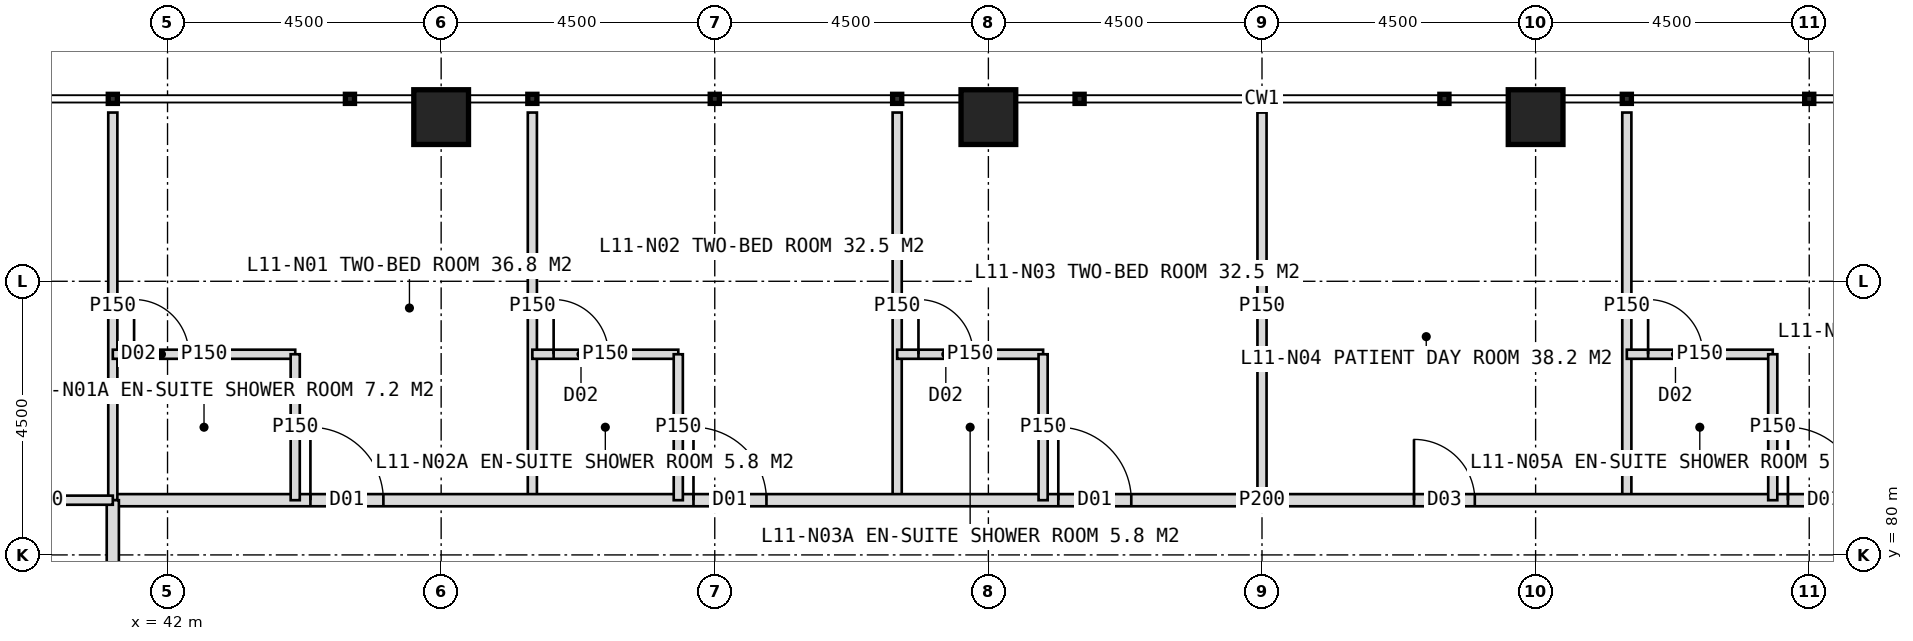
"""IFC4 building model, lengths in metres.
Left out: names, types, materials, properties, quantities, classifications, styles, units other than length and angle.
Written with IfcOpenShell. Run it as: python <this file> out.ifc"""

import sys

from ifc_helpers import new_model, si_unit, direction, frame, frame_2d, origin, origin_2d, place, context, subcontext, project, spatial, rectangle, hollow_rectangle, extrude, element, fill, save


model = new_model("IFC4")
c1 = context("Model", 3, precision=1e-05, world=origin(), true_north=direction((0.0, 1.0)))
c2 = subcontext(c1, "Body", "Model", "MODEL_VIEW")
j1 = project(units=[si_unit("LENGTHUNIT", "METRE"), si_unit("PLANEANGLEUNIT", "RADIAN")], contexts=[c1])
p1 = place(None, origin())
s1 = spatial("IfcSite", under=j1, at=p1, CompositionType="ELEMENT")
p2 = place(p1, origin())
s2 = spatial("IfcBuilding", under=s1, at=p2, CompositionType="ELEMENT")
p3 = place(p2, frame((0.0, 0.0, 51.0)))
s3 = spatial("IfcBuildingStorey", under=s2, at=p3, CompositionType="ELEMENT", Elevation=51.0)
for number, where, z_axis, x_axis in (
    (1, (46.5, 87.2, 0.0), (0.0, 0.0, 1.0), (1.0, 0.0, 0.0)),
    (2, (55.5, 87.2, 0.0), (0.0, 0.0, 1.0), (1.0, 0.0, 0.0)),
    (3, (64.5, 87.2, 0.0), (0.0, 0.0, 1.0), (1.0, 0.0, 0.0)),
):
    element("IfcColumn", number, at=place(p3, frame(where, z_axis=z_axis, x_axis=x_axis)), inside=s3, PredefinedType="COLUMN", context=c2, shape_type="SweptSolid", body=[
        extrude(hollow_rectangle(XDim=0.9, YDim=0.9, WallThickness=0.08, at=origin_2d()), origin(), (0.0, 0.0, 1.0), 4.0),
    ])
for number, where, z_axis, x_axis in (
    (4, (48.0, 80.9, 0.0), (0.0, 0.0, 1.0), (0.0, 1.0, 0.0)),
    (5, (54.0, 80.9, 0.0), (0.0, 0.0, 1.0), (0.0, 1.0, 0.0)),
):
    element("IfcWall", number, at=place(p3, frame(where, z_axis=z_axis, x_axis=x_axis)), inside=s3, PredefinedType="PARTITIONING", context=c2, shape_type="SweptSolid", body=[
        extrude(rectangle(XDim=6.375, YDim=0.15, at=frame_2d((3.188, 0.0))), origin(), (0.0, 0.0, 1.0), 3.75),
    ])
p4 = place(p3, frame((60.0, 80.9, 0.0), z_axis=(0.0, 0.0, 1.0), x_axis=(0.0, 1.0, 0.0)))
e6 = element("IfcWall", 6, at=p4, inside=s3, PredefinedType="PARTITIONING", context=c2, shape_type="SweptSolid", body=[
    extrude(rectangle(XDim=6.375, YDim=0.15, at=frame_2d((3.188, 0.0))), origin(), (0.0, 0.0, 1.0), 2.75),
])
p5 = place(p3, frame((66.0, 80.9, 0.0), z_axis=(0.0, 0.0, 1.0), x_axis=(0.0, 1.0, 0.0)))
e7 = element("IfcWall", 7, at=p5, inside=s3, PredefinedType="PARTITIONING", context=c2, shape_type="SweptSolid", body=[
    extrude(rectangle(XDim=6.375, YDim=0.15, at=frame_2d((3.188, 0.0))), origin(), (0.0, 0.0, 1.0), 3.75),
])
p6 = place(p3, frame((41.1, 80.9, 0.0), z_axis=(0.0, 0.0, 1.0), x_axis=(1.0, 0.0, 0.0)))
e8 = element("IfcWall", 8, at=p6, inside=s3, PredefinedType="PARTITIONING", context=c2, shape_type="SweptSolid", body=[
    extrude(rectangle(XDim=37.8, YDim=0.2, at=frame_2d((18.9, 0.0))), origin(), (0.0, 0.0, 1.0), 3.75),
])
p7 = place(p6, frame((3.25, 0.0, 0.0)))
e9 = element("IfcOpeningElement", 9, at=p7, cuts=e8, PredefinedType="OPENING", context=c2, shape_type="SweptSolid", body=[
    extrude(rectangle(XDim=1.2, YDim=2.2, at=frame_2d((0.6, 1.1))), frame((0.0, 0.11, 0.0), z_axis=(0.0, -1.0, 0.0), x_axis=(1.0, 0.0, 0.0)), (0.0, 0.0, 1.0), 0.22),
])
p8 = place(p6, frame((9.55, 0.0, 0.0)))
e10 = element("IfcOpeningElement", 10, at=p8, cuts=e8, PredefinedType="OPENING", context=c2, shape_type="SweptSolid", body=[
    extrude(rectangle(XDim=1.2, YDim=2.2, at=frame_2d((0.6, 1.1))), frame((0.0, 0.11, 0.0), z_axis=(0.0, -1.0, 0.0), x_axis=(1.0, 0.0, 0.0)), (0.0, 0.0, 1.0), 0.22),
])
p9 = place(p6, frame((15.55, 0.0, 0.0)))
e11 = element("IfcOpeningElement", 11, at=p9, cuts=e8, PredefinedType="OPENING", context=c2, shape_type="SweptSolid", body=[
    extrude(rectangle(XDim=1.2, YDim=2.2, at=frame_2d((0.6, 1.1))), frame((0.0, 0.11, 0.0), z_axis=(0.0, -1.0, 0.0), x_axis=(1.0, 0.0, 0.0)), (0.0, 0.0, 1.0), 0.22),
])
p10 = place(p6, frame((21.4, 0.0, 0.0)))
e12 = element("IfcOpeningElement", 12, at=p10, cuts=e8, PredefinedType="OPENING", context=c2, shape_type="SweptSolid", body=[
    extrude(rectangle(XDim=1.0, YDim=2.1, at=frame_2d((0.5, 1.05))), frame((0.0, 0.11, 0.0), z_axis=(0.0, -1.0, 0.0), x_axis=(1.0, 0.0, 0.0)), (0.0, 0.0, 1.0), 0.22),
])
p11 = place(p6, frame((27.55, 0.0, 0.0)))
e13 = element("IfcOpeningElement", 13, at=p11, cuts=e8, PredefinedType="OPENING", context=c2, shape_type="SweptSolid", body=[
    extrude(rectangle(XDim=1.2, YDim=2.2, at=frame_2d((0.6, 1.1))), frame((0.0, 0.11, 0.0), z_axis=(0.0, -1.0, 0.0), x_axis=(1.0, 0.0, 0.0)), (0.0, 0.0, 1.0), 0.22),
])
p12 = place(p3, frame((41.1, 80.9, 0.0), z_axis=(0.0, 0.0, 1.0), x_axis=(0.0, 1.0, 0.0)))
e14 = element("IfcWall", 14, at=p12, inside=s3, PredefinedType="PARTITIONING", context=c2, shape_type="SweptSolid", body=[
    extrude(rectangle(XDim=6.375, YDim=0.15, at=frame_2d((3.188, 0.0))), origin(), (0.0, 0.0, 1.0), 3.75),
])
p13 = place(p3, frame((41.1, 83.3, 0.0), z_axis=(0.0, 0.0, 1.0), x_axis=(1.0, 0.0, 0.0)))
e15 = element("IfcWall", 15, at=p13, inside=s3, PredefinedType="PARTITIONING", context=c2, shape_type="SweptSolid", body=[
    extrude(rectangle(XDim=3.0, YDim=0.15, at=frame_2d((1.5, 0.0))), origin(), (0.0, 0.0, 1.0), 3.75),
])
p14 = place(p13, frame((0.35, 0.0, 0.0)))
e16 = element("IfcOpeningElement", 16, at=p14, cuts=e15, PredefinedType="OPENING", context=c2, shape_type="SweptSolid", body=[
    extrude(rectangle(XDim=0.9, YDim=2.1, at=frame_2d((0.45, 1.05))), frame((0.0, 0.085, 0.0), z_axis=(0.0, -1.0, 0.0), x_axis=(1.0, 0.0, 0.0)), (0.0, 0.0, 1.0), 0.17),
])
p15 = place(p3, frame((44.1, 80.9, 0.0), z_axis=(0.0, 0.0, 1.0), x_axis=(0.0, 1.0, 0.0)))
e17 = element("IfcWall", 17, at=p15, inside=s3, PredefinedType="PARTITIONING", context=c2, shape_type="SweptSolid", body=[
    extrude(rectangle(XDim=2.4, YDim=0.15, at=frame_2d((1.2, 0.0))), origin(), (0.0, 0.0, 1.0), 3.75),
])
p16 = place(p3, frame((48.0, 83.3, 0.0), z_axis=(0.0, 0.0, 1.0), x_axis=(1.0, 0.0, 0.0)))
e18 = element("IfcWall", 18, at=p16, inside=s3, PredefinedType="PARTITIONING", context=c2, shape_type="SweptSolid", body=[
    extrude(rectangle(XDim=2.4, YDim=0.15, at=frame_2d((1.2, 0.0))), origin(), (0.0, 0.0, 1.0), 3.75),
])
p17 = place(p16, frame((0.35, 0.0, 0.0)))
e19 = element("IfcOpeningElement", 19, at=p17, cuts=e18, PredefinedType="OPENING", context=c2, shape_type="SweptSolid", body=[
    extrude(rectangle(XDim=0.9, YDim=2.1, at=frame_2d((0.45, 1.05))), frame((0.0, 0.085, 0.0), z_axis=(0.0, -1.0, 0.0), x_axis=(1.0, 0.0, 0.0)), (0.0, 0.0, 1.0), 0.17),
])
p18 = place(p3, frame((50.4, 80.9, 0.0), z_axis=(0.0, 0.0, 1.0), x_axis=(0.0, 1.0, 0.0)))
e20 = element("IfcWall", 20, at=p18, inside=s3, PredefinedType="PARTITIONING", context=c2, shape_type="SweptSolid", body=[
    extrude(rectangle(XDim=2.4, YDim=0.15, at=frame_2d((1.2, 0.0))), origin(), (0.0, 0.0, 1.0), 3.75),
])
p19 = place(p3, frame((54.0, 83.3, 0.0), z_axis=(0.0, 0.0, 1.0), x_axis=(1.0, 0.0, 0.0)))
e21 = element("IfcWall", 21, at=p19, inside=s3, PredefinedType="PARTITIONING", context=c2, shape_type="SweptSolid", body=[
    extrude(rectangle(XDim=2.4, YDim=0.15, at=frame_2d((1.2, 0.0))), origin(), (0.0, 0.0, 1.0), 3.75),
])
p20 = place(p19, frame((0.35, 0.0, 0.0)))
e22 = element("IfcOpeningElement", 22, at=p20, cuts=e21, PredefinedType="OPENING", context=c2, shape_type="SweptSolid", body=[
    extrude(rectangle(XDim=0.9, YDim=2.1, at=frame_2d((0.45, 1.05))), frame((0.0, 0.085, 0.0), z_axis=(0.0, -1.0, 0.0), x_axis=(1.0, 0.0, 0.0)), (0.0, 0.0, 1.0), 0.17),
])
p21 = place(p3, frame((56.4, 80.9, 0.0), z_axis=(0.0, 0.0, 1.0), x_axis=(0.0, 1.0, 0.0)))
e23 = element("IfcWall", 23, at=p21, inside=s3, PredefinedType="PARTITIONING", context=c2, shape_type="SweptSolid", body=[
    extrude(rectangle(XDim=2.4, YDim=0.15, at=frame_2d((1.2, 0.0))), origin(), (0.0, 0.0, 1.0), 3.75),
])
p22 = place(p3, frame((66.0, 83.3, 0.0), z_axis=(0.0, 0.0, 1.0), x_axis=(1.0, 0.0, 0.0)))
e24 = element("IfcWall", 24, at=p22, inside=s3, PredefinedType="PARTITIONING", context=c2, shape_type="SweptSolid", body=[
    extrude(rectangle(XDim=2.4, YDim=0.15, at=frame_2d((1.2, 0.0))), origin(), (0.0, 0.0, 1.0), 3.75),
])
p23 = place(p22, frame((0.35, 0.0, 0.0)))
e25 = element("IfcOpeningElement", 25, at=p23, cuts=e24, PredefinedType="OPENING", context=c2, shape_type="SweptSolid", body=[
    extrude(rectangle(XDim=0.9, YDim=2.1, at=frame_2d((0.45, 1.05))), frame((0.0, 0.085, 0.0), z_axis=(0.0, -1.0, 0.0), x_axis=(1.0, 0.0, 0.0)), (0.0, 0.0, 1.0), 0.17),
])
p24 = place(p3, frame((68.4, 80.9, 0.0), z_axis=(0.0, 0.0, 1.0), x_axis=(0.0, 1.0, 0.0)))
e26 = element("IfcWall", 26, at=p24, inside=s3, PredefinedType="PARTITIONING", context=c2, shape_type="SweptSolid", body=[
    extrude(rectangle(XDim=2.4, YDim=0.15, at=frame_2d((1.2, 0.0))), origin(), (0.0, 0.0, 1.0), 3.75),
])
p25 = place(p3, frame((41.1, 43.1, 0.0), z_axis=(0.0, 0.0, 1.0), x_axis=(0.0, 1.0, 0.0)))
e27 = element("IfcWall", 27, at=p25, inside=s3, PredefinedType="PARTITIONING", context=c2, shape_type="SweptSolid", body=[
    extrude(rectangle(XDim=37.8, YDim=0.2, at=frame_2d((18.9, 0.0))), origin(), (0.0, 0.0, 1.0), 3.75),
])
p26 = place(p25, frame((3.25, 0.0, 0.0)))
e28 = element("IfcOpeningElement", 28, at=p26, cuts=e27, PredefinedType="OPENING", context=c2, shape_type="SweptSolid", body=[
    extrude(rectangle(XDim=1.2, YDim=2.2, at=frame_2d((0.6, 1.1))), frame((0.0, 0.11, 0.0), z_axis=(0.0, -1.0, 0.0), x_axis=(1.0, 0.0, 0.0)), (0.0, 0.0, 1.0), 0.22),
])
p27 = place(p25, frame((9.55, 0.0, 0.0)))
e29 = element("IfcOpeningElement", 29, at=p27, cuts=e27, PredefinedType="OPENING", context=c2, shape_type="SweptSolid", body=[
    extrude(rectangle(XDim=1.2, YDim=2.2, at=frame_2d((0.6, 1.1))), frame((0.0, 0.11, 0.0), z_axis=(0.0, -1.0, 0.0), x_axis=(1.0, 0.0, 0.0)), (0.0, 0.0, 1.0), 0.22),
])
p28 = place(p25, frame((15.55, 0.0, 0.0)))
e30 = element("IfcOpeningElement", 30, at=p28, cuts=e27, PredefinedType="OPENING", context=c2, shape_type="SweptSolid", body=[
    extrude(rectangle(XDim=1.2, YDim=2.2, at=frame_2d((0.6, 1.1))), frame((0.0, 0.11, 0.0), z_axis=(0.0, -1.0, 0.0), x_axis=(1.0, 0.0, 0.0)), (0.0, 0.0, 1.0), 0.22),
])
p29 = place(p25, frame((21.55, 0.0, 0.0)))
e31 = element("IfcOpeningElement", 31, at=p29, cuts=e27, PredefinedType="OPENING", context=c2, shape_type="SweptSolid", body=[
    extrude(rectangle(XDim=1.2, YDim=2.2, at=frame_2d((0.6, 1.1))), frame((0.0, 0.11, 0.0), z_axis=(0.0, -1.0, 0.0), x_axis=(1.0, 0.0, 0.0)), (0.0, 0.0, 1.0), 0.22),
])
p30 = place(p25, frame((27.55, 0.0, 0.0)))
e32 = element("IfcOpeningElement", 32, at=p30, cuts=e27, PredefinedType="OPENING", context=c2, shape_type="SweptSolid", body=[
    extrude(rectangle(XDim=1.2, YDim=2.2, at=frame_2d((0.6, 1.1))), frame((0.0, 0.11, 0.0), z_axis=(0.0, -1.0, 0.0), x_axis=(1.0, 0.0, 0.0)), (0.0, 0.0, 1.0), 0.22),
])
p31 = place(p3, frame((41.1, 80.9, 0.0), z_axis=(0.0, 0.0, 1.0), x_axis=(-1.0, 0.0, 0.0)))
e33 = element("IfcWall", 33, at=p31, inside=s3, PredefinedType="PARTITIONING", context=c2, shape_type="SweptSolid", body=[
    extrude(rectangle(XDim=2.4, YDim=0.15, at=frame_2d((1.2, 0.0))), origin(), (0.0, 0.0, 1.0), 3.75),
])
p32 = place(p7, origin())
e34 = element("IfcDoor", 34, at=p32, inside=s3, OperationType="SINGLE_SWING_LEFT", PredefinedType="DOOR", context=c2, shape_type="SweptSolid", body=[
    extrude(rectangle(XDim=1.2, YDim=2.2, at=frame_2d((0.6, 1.1))), frame((0.0, 0.025, 0.0), z_axis=(0.0, -1.0, 0.0), x_axis=(1.0, 0.0, 0.0)), (0.0, 0.0, 1.0), 0.05),
])
fill(e9, e34)
p33 = place(p14, origin())
e35 = element("IfcDoor", 35, at=p33, inside=s3, OperationType="SINGLE_SWING_LEFT", PredefinedType="DOOR", context=c2, shape_type="SweptSolid", body=[
    extrude(rectangle(XDim=0.9, YDim=2.1, at=frame_2d((0.45, 1.05))), frame((0.0, 0.025, 0.0), z_axis=(0.0, -1.0, 0.0), x_axis=(1.0, 0.0, 0.0)), (0.0, 0.0, 1.0), 0.05),
])
fill(e16, e35)
p34 = place(p8, origin())
e36 = element("IfcDoor", 36, at=p34, inside=s3, OperationType="SINGLE_SWING_LEFT", PredefinedType="DOOR", context=c2, shape_type="SweptSolid", body=[
    extrude(rectangle(XDim=1.2, YDim=2.2, at=frame_2d((0.6, 1.1))), frame((0.0, 0.025, 0.0), z_axis=(0.0, -1.0, 0.0), x_axis=(1.0, 0.0, 0.0)), (0.0, 0.0, 1.0), 0.05),
])
fill(e10, e36)
p35 = place(p17, origin())
e37 = element("IfcDoor", 37, at=p35, inside=s3, OperationType="SINGLE_SWING_LEFT", PredefinedType="DOOR", context=c2, shape_type="SweptSolid", body=[
    extrude(rectangle(XDim=0.9, YDim=2.1, at=frame_2d((0.45, 1.05))), frame((0.0, 0.025, 0.0), z_axis=(0.0, -1.0, 0.0), x_axis=(1.0, 0.0, 0.0)), (0.0, 0.0, 1.0), 0.05),
])
fill(e19, e37)
p36 = place(p9, origin())
e38 = element("IfcDoor", 38, at=p36, inside=s3, OperationType="SINGLE_SWING_LEFT", PredefinedType="DOOR", context=c2, shape_type="SweptSolid", body=[
    extrude(rectangle(XDim=1.2, YDim=2.2, at=frame_2d((0.6, 1.1))), frame((0.0, 0.025, 0.0), z_axis=(0.0, -1.0, 0.0), x_axis=(1.0, 0.0, 0.0)), (0.0, 0.0, 1.0), 0.05),
])
fill(e11, e38)
p37 = place(p20, origin())
e39 = element("IfcDoor", 39, at=p37, inside=s3, OperationType="SINGLE_SWING_LEFT", PredefinedType="DOOR", context=c2, shape_type="SweptSolid", body=[
    extrude(rectangle(XDim=0.9, YDim=2.1, at=frame_2d((0.45, 1.05))), frame((0.0, 0.025, 0.0), z_axis=(0.0, -1.0, 0.0), x_axis=(1.0, 0.0, 0.0)), (0.0, 0.0, 1.0), 0.05),
])
fill(e22, e39)
p38 = place(p10, origin())
e40 = element("IfcDoor", 40, at=p38, inside=s3, OperationType="SINGLE_SWING_LEFT", PredefinedType="DOOR", context=c2, shape_type="SweptSolid", body=[
    extrude(rectangle(XDim=1.0, YDim=2.1, at=frame_2d((0.5, 1.05))), frame((0.0, 0.025, 0.0), z_axis=(0.0, -1.0, 0.0), x_axis=(1.0, 0.0, 0.0)), (0.0, 0.0, 1.0), 0.05),
])
fill(e12, e40)
p39 = place(p11, origin())
e41 = element("IfcDoor", 41, at=p39, inside=s3, OperationType="SINGLE_SWING_LEFT", PredefinedType="DOOR", context=c2, shape_type="SweptSolid", body=[
    extrude(rectangle(XDim=1.2, YDim=2.2, at=frame_2d((0.6, 1.1))), frame((0.0, 0.025, 0.0), z_axis=(0.0, -1.0, 0.0), x_axis=(1.0, 0.0, 0.0)), (0.0, 0.0, 1.0), 0.05),
])
fill(e13, e41)
p40 = place(p23, origin())
e42 = element("IfcDoor", 42, at=p40, inside=s3, OperationType="SINGLE_SWING_LEFT", PredefinedType="DOOR", context=c2, shape_type="SweptSolid", body=[
    extrude(rectangle(XDim=0.9, YDim=2.1, at=frame_2d((0.45, 1.05))), frame((0.0, 0.025, 0.0), z_axis=(0.0, -1.0, 0.0), x_axis=(1.0, 0.0, 0.0)), (0.0, 0.0, 1.0), 0.05),
])
fill(e25, e42)
save(model, sys.argv[1])
